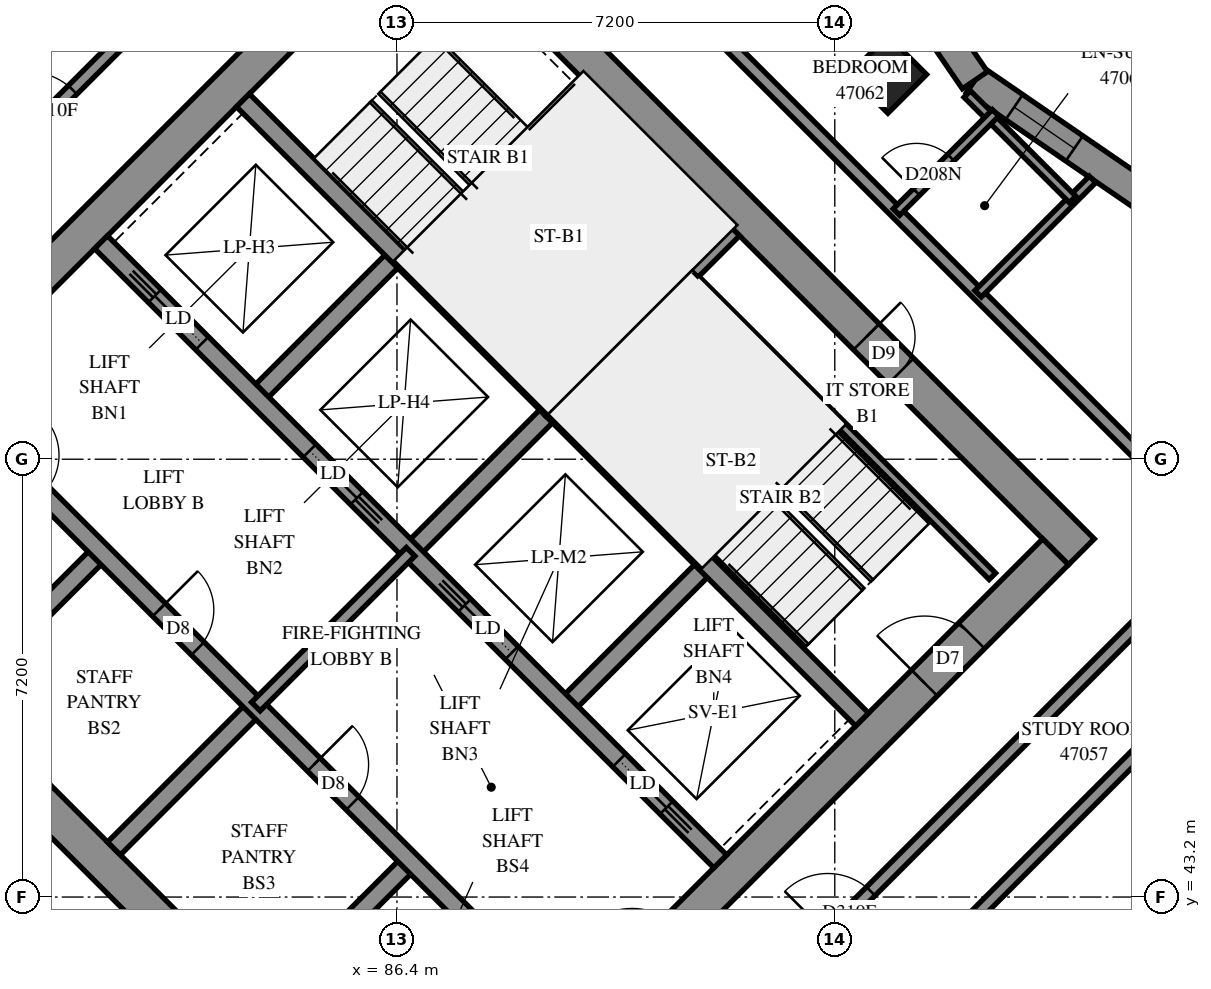
"""IFC4 building model, lengths in metres.
Left out: names, types, materials, properties, quantities, classifications, styles, units other than length and angle.
Written with IfcOpenShell. Run it as: python <this file> out.ifc"""

import sys

from ifc_helpers import new_model, si_unit, direction, frame, frame_2d, origin, origin_2d, place, context, subcontext, project, spatial, polyline, rectangle, outline, extrude, element, fill, save


model = new_model("IFC4")
c1 = context("Model", 3, precision=1e-05, world=origin(), true_north=direction((0.0, 1.0)))
c2 = subcontext(c1, "Body", "Model", "MODEL_VIEW")
j1 = project(units=[si_unit("LENGTHUNIT", "METRE"), si_unit("PLANEANGLEUNIT", "RADIAN")], contexts=[c1])
p1 = place(None, origin())
s1 = spatial("IfcSite", under=j1, at=p1, CompositionType="ELEMENT")
p2 = place(p1, origin())
s2 = spatial("IfcBuilding", under=s1, at=p2, CompositionType="ELEMENT")
p3 = place(p2, frame((0.0, 0.0, 172.8)))
s3 = spatial("IfcBuildingStorey", under=s2, at=p3, CompositionType="ELEMENT", Elevation=172.8)
p4 = place(p3, frame((94.474, 56.727, 0.0), z_axis=(0.0, 0.0, 1.0), x_axis=(0.7071067812, -0.7071067812, 0.0)))
e1 = element("IfcColumn", 1, at=p4, inside=s3, PredefinedType="COLUMN", context=c2, shape_type="SweptSolid", body=[
    extrude(rectangle(XDim=0.9, YDim=0.9, at=origin_2d()), origin(), (0.0, 0.0, 1.0), 3.1),
])
p5 = place(p3, frame((76.018, 49.302, -0.3), z_axis=(0.0, 0.0, 1.0), x_axis=(0.7071067812, -0.7071067812, 0.0)))
e2 = element("IfcWall", 2, at=p5, inside=s3, PredefinedType="SHEAR", context=c2, shape_type="SweptSolid", body=[
    extrude(rectangle(XDim=15.6, YDim=0.6, at=frame_2d((7.8, 0.0))), origin(), (0.0, 0.0, 1.0), 2.7),
])
p6 = place(p3, frame((86.625, 59.908, -0.3), z_axis=(0.0, 0.0, 1.0), x_axis=(0.7071067812, -0.7071067812, 0.0)))
e3 = element("IfcWall", 3, at=p6, inside=s3, PredefinedType="SHEAR", context=c2, shape_type="SweptSolid", body=[
    extrude(rectangle(XDim=15.6, YDim=0.6, at=frame_2d((7.8, 0.0))), origin(), (0.0, 0.0, 1.0), 2.7),
])
p7 = place(p6, frame((10.6, 0.0, 0.3)))
e4 = element("IfcOpeningElement", 4, at=p7, cuts=e3, PredefinedType="OPENING", context=c2, shape_type="SweptSolid", body=[
    extrude(rectangle(XDim=0.8, YDim=2.1, at=frame_2d((0.4, 1.05))), frame((0.0, 0.31, 0.0), z_axis=(0.0, -1.0, 0.0), x_axis=(1.0, 0.0, 0.0)), (0.0, 0.0, 1.0), 0.62),
])
p8 = place(p3, frame((76.442, 49.302, -0.3), z_axis=(0.0, 0.0, 1.0), x_axis=(0.7071067812, 0.7071067812, 0.0)))
e5 = element("IfcWall", 5, at=p8, inside=s3, PredefinedType="SHEAR", context=c2, shape_type="SweptSolid", body=[
    extrude(rectangle(XDim=14.4, YDim=0.6, at=frame_2d((7.2, 0.0))), origin(), (0.0, 0.0, 1.0), 2.7),
])
p9 = place(p8, frame((4.55, 0.0, 0.3)))
e6 = element("IfcOpeningElement", 6, at=p9, cuts=e5, PredefinedType="OPENING", context=c2, shape_type="SweptSolid", body=[
    extrude(rectangle(XDim=1.1, YDim=2.1, at=frame_2d((0.55, 1.05))), frame((0.0, 0.31, 0.0), z_axis=(0.0, -1.0, 0.0), x_axis=(1.0, 0.0, 0.0)), (0.0, 0.0, 1.0), 0.62),
])
p10 = place(p8, frame((11.35, 0.0, 0.3)))
e7 = element("IfcOpeningElement", 7, at=p10, cuts=e5, PredefinedType="OPENING", context=c2, shape_type="SweptSolid", body=[
    extrude(rectangle(XDim=1.1, YDim=2.1, at=frame_2d((0.55, 1.05))), frame((0.0, 0.31, 0.0), z_axis=(0.0, -1.0, 0.0), x_axis=(1.0, 0.0, 0.0)), (0.0, 0.0, 1.0), 0.62),
])
p11 = place(p3, frame((87.049, 38.695, -0.3), z_axis=(0.0, 0.0, 1.0), x_axis=(0.7071067812, 0.7071067812, 0.0)))
e8 = element("IfcWall", 8, at=p11, inside=s3, PredefinedType="SHEAR", context=c2, shape_type="SweptSolid", body=[
    extrude(rectangle(XDim=14.4, YDim=0.6, at=frame_2d((7.2, 0.0))), origin(), (0.0, 0.0, 1.0), 2.7),
])
p12 = place(p11, frame((4.55, 0.0, 0.3)))
e9 = element("IfcOpeningElement", 9, at=p12, cuts=e8, PredefinedType="OPENING", context=c2, shape_type="SweptSolid", body=[
    extrude(rectangle(XDim=1.1, YDim=2.1, at=frame_2d((0.55, 1.05))), frame((0.0, 0.31, 0.0), z_axis=(0.0, -1.0, 0.0), x_axis=(1.0, 0.0, 0.0)), (0.0, 0.0, 1.0), 0.62),
])
p13 = place(p11, frame((11.35, 0.0, 0.3)))
e10 = element("IfcOpeningElement", 10, at=p13, cuts=e8, PredefinedType="OPENING", context=c2, shape_type="SweptSolid", body=[
    extrude(rectangle(XDim=1.1, YDim=2.1, at=frame_2d((0.55, 1.05))), frame((0.0, 0.31, 0.0), z_axis=(0.0, -1.0, 0.0), x_axis=(1.0, 0.0, 0.0)), (0.0, 0.0, 1.0), 0.62),
])
for number, where, z_axis, x_axis in (
    (11, (79.2, 46.544, 0.0), (0.0, 0.0, 1.0), (0.707, 0.707, 0.0)),
    (12, (84.079, 51.423, 0.0), (0.0, 0.0, 1.0), (0.707, 0.707, 0.0)),
):
    element("IfcWall", number, at=place(p3, frame(where, z_axis=z_axis, x_axis=x_axis)), inside=s3, PredefinedType="SOLIDWALL", context=c2, shape_type="SweptSolid", body=[
        extrude(rectangle(XDim=3.3, YDim=0.3, at=frame_2d((1.65, 0.0))), origin(), (0.0, 0.0, 1.0), 3.1),
    ])
p14 = place(p3, frame((81.746, 43.999, 0.0), z_axis=(0.0, 0.0, 1.0), x_axis=(0.7071067812, 0.7071067812, 0.0)))
e13 = element("IfcWall", 13, at=p14, inside=s3, PredefinedType="SOLIDWALL", context=c2, shape_type="SweptSolid", body=[
    extrude(rectangle(XDim=3.3, YDim=0.3, at=frame_2d((1.65, 0.0))), origin(), (0.0, 0.0, 1.0), 3.1),
])
p15 = place(p3, frame((86.625, 48.878, 0.0), z_axis=(0.0, 0.0, 1.0), x_axis=(0.7071067812, 0.7071067812, 0.0)))
e14 = element("IfcWall", 14, at=p15, inside=s3, PredefinedType="SOLIDWALL", context=c2, shape_type="SweptSolid", body=[
    extrude(rectangle(XDim=3.3, YDim=0.3, at=frame_2d((1.65, 0.0))), origin(), (0.0, 0.0, 1.0), 3.1),
])
p16 = place(p3, frame((84.291, 41.453, 0.0), z_axis=(0.0, 0.0, 1.0), x_axis=(0.7071067812, 0.7071067812, 0.0)))
e15 = element("IfcWall", 15, at=p16, inside=s3, PredefinedType="SOLIDWALL", context=c2, shape_type="SweptSolid", body=[
    extrude(rectangle(XDim=3.3, YDim=0.3, at=frame_2d((1.65, 0.0))), origin(), (0.0, 0.0, 1.0), 3.1),
])
p17 = place(p3, frame((89.17, 46.332, 0.0), z_axis=(0.0, 0.0, 1.0), x_axis=(0.7071067812, 0.7071067812, 0.0)))
e16 = element("IfcWall", 16, at=p17, inside=s3, PredefinedType="SOLIDWALL", context=c2, shape_type="SweptSolid", body=[
    extrude(rectangle(XDim=3.3, YDim=0.3, at=frame_2d((1.65, 0.0))), origin(), (0.0, 0.0, 1.0), 3.1),
])
p18 = place(p3, frame((78.988, 51.423, 0.0), z_axis=(0.0, 0.0, 1.0), x_axis=(0.7071067812, -0.7071067812, 0.0)))
e17 = element("IfcWall", 17, at=p18, inside=s3, PredefinedType="SOLIDWALL", context=c2, shape_type="SweptSolid", body=[
    extrude(rectangle(XDim=14.4, YDim=0.3, at=frame_2d((7.2, 0.0))), origin(), (0.0, 0.0, 1.0), 3.1),
])
p19 = place(p18, frame((1.35, 0.0, 0.0)))
e18 = element("IfcOpeningElement", 18, at=p19, cuts=e17, PredefinedType="OPENING", context=c2, shape_type="SweptSolid", body=[
    extrude(rectangle(XDim=0.9, YDim=2.1, at=frame_2d((0.45, 1.05))), frame((0.0, 0.16, 0.0), z_axis=(0.0, -1.0, 0.0), x_axis=(1.0, 0.0, 0.0)), (0.0, 0.0, 1.0), 0.32),
])
p20 = place(p18, frame((4.95, 0.0, 0.0)))
e19 = element("IfcOpeningElement", 19, at=p20, cuts=e17, PredefinedType="OPENING", context=c2, shape_type="SweptSolid", body=[
    extrude(rectangle(XDim=0.9, YDim=2.1, at=frame_2d((0.45, 1.05))), frame((0.0, 0.16, 0.0), z_axis=(0.0, -1.0, 0.0), x_axis=(1.0, 0.0, 0.0)), (0.0, 0.0, 1.0), 0.32),
])
p21 = place(p18, frame((8.55, 0.0, 0.0)))
e20 = element("IfcOpeningElement", 20, at=p21, cuts=e17, PredefinedType="OPENING", context=c2, shape_type="SweptSolid", body=[
    extrude(rectangle(XDim=0.9, YDim=2.1, at=frame_2d((0.45, 1.05))), frame((0.0, 0.16, 0.0), z_axis=(0.0, -1.0, 0.0), x_axis=(1.0, 0.0, 0.0)), (0.0, 0.0, 1.0), 0.32),
])
p22 = place(p18, frame((12.05, 0.0, 0.0)))
e21 = element("IfcOpeningElement", 21, at=p22, cuts=e17, PredefinedType="OPENING", context=c2, shape_type="SweptSolid", body=[
    extrude(rectangle(XDim=1.1, YDim=2.1, at=frame_2d((0.55, 1.05))), frame((0.0, 0.16, 0.0), z_axis=(0.0, -1.0, 0.0), x_axis=(1.0, 0.0, 0.0)), (0.0, 0.0, 1.0), 0.32),
])
p23 = place(p3, frame((81.534, 53.969, 0.0), z_axis=(0.0, 0.0, 1.0), x_axis=(0.707103309, -0.7071102534, 0.0)))
e22 = element("IfcWall", 22, at=p23, inside=s3, PredefinedType="SOLIDWALL", context=c2, shape_type="SweptSolid", body=[
    extrude(rectangle(XDim=14.4, YDim=0.3, at=frame_2d((7.2, 0.0))), origin(), (0.0, 0.0, 1.0), 3.1),
])
p24 = place(p23, frame((1.25, 0.0, 0.0)))
e23 = element("IfcOpeningElement", 23, at=p24, cuts=e22, PredefinedType="OPENING", context=c2, shape_type="SweptSolid", body=[
    extrude(rectangle(XDim=1.1, YDim=2.1, at=frame_2d((0.55, 1.05))), frame((0.0, 0.16, 0.0), z_axis=(0.0, -1.0, 0.0), x_axis=(1.0, 0.0, 0.0)), (0.0, 0.0, 1.0), 0.32),
])
p25 = place(p23, frame((4.85, 0.0, 0.0)))
e24 = element("IfcOpeningElement", 24, at=p25, cuts=e22, PredefinedType="OPENING", context=c2, shape_type="SweptSolid", body=[
    extrude(rectangle(XDim=1.1, YDim=2.1, at=frame_2d((0.55, 1.05))), frame((0.0, 0.16, 0.0), z_axis=(0.0, -1.0, 0.0), x_axis=(1.0, 0.0, 0.0)), (0.0, 0.0, 1.0), 0.32),
])
p26 = place(p23, frame((8.45, 0.0, 0.0)))
e25 = element("IfcOpeningElement", 25, at=p26, cuts=e22, PredefinedType="OPENING", context=c2, shape_type="SweptSolid", body=[
    extrude(rectangle(XDim=1.1, YDim=2.1, at=frame_2d((0.55, 1.05))), frame((0.0, 0.16, 0.0), z_axis=(0.0, -1.0, 0.0), x_axis=(1.0, 0.0, 0.0)), (0.0, 0.0, 1.0), 0.32),
])
p27 = place(p23, frame((12.05, 0.0, 0.0)))
e26 = element("IfcOpeningElement", 26, at=p27, cuts=e22, PredefinedType="OPENING", context=c2, shape_type="SweptSolid", body=[
    extrude(rectangle(XDim=1.1, YDim=2.1, at=frame_2d((0.55, 1.05))), frame((0.0, 0.16, 0.0), z_axis=(0.0, -1.0, 0.0), x_axis=(1.0, 0.0, 0.0)), (0.0, 0.0, 1.0), 0.32),
])
for number, where, z_axis, x_axis in (
    (27, (83.867, 56.302, 0.0), (0.0, 0.0, 1.0), (0.707, -0.707, 0.0)),
    (28, (88.958, 51.211, 0.0), (0.0, 0.0, 1.0), (0.707, -0.707, 0.0)),
):
    element("IfcWall", number, at=place(p3, frame(where, z_axis=z_axis, x_axis=x_axis)), inside=s3, PredefinedType="SOLIDWALL", context=c2, shape_type="SweptSolid", body=[
        extrude(rectangle(XDim=7.2, YDim=0.3, at=frame_2d((3.6, 0.0))), origin(), (0.0, 0.0, 1.0), 3.1),
    ])
p28 = place(p3, frame((88.958, 51.211, 0.0), z_axis=(0.0, 0.0, 1.0), x_axis=(0.7071067812, 0.7071067812, 0.0)))
e29 = element("IfcWall", 29, at=p28, inside=s3, PredefinedType="SOLIDWALL", context=c2, shape_type="SweptSolid", body=[
    extrude(rectangle(XDim=4.2, YDim=0.3, at=frame_2d((2.1, 0.0))), origin(), (0.0, 0.0, 1.0), 3.1),
])
p29 = place(p3, frame((98.744, 54.685, 0.0), z_axis=(0.0, 0.0, 1.0), x_axis=(-0.8245797835, 0.5657456855, 0.0)))
e30 = element("IfcWall", 30, at=p29, inside=s3, PredefinedType="SOLIDWALL", context=c2, shape_type="SweptSolid", body=[
    extrude(outline(polyline([(-0.046, -0.25), (3.396, -0.25), (3.489, 0.25), (0.046, 0.25), (-0.046, -0.25)])), origin(), (0.0, 0.0, 1.0), 3.1),
])
p30 = place(p29, frame((1.46, 0.0, 0.45)))
e31 = element("IfcOpeningElement", 31, at=p30, cuts=e30, PredefinedType="OPENING", context=c2, shape_type="SweptSolid", body=[
    extrude(rectangle(XDim=1.2, YDim=2.5, at=frame_2d((0.6, 1.25))), frame((0.0, 0.26, 0.0), z_axis=(0.0, -1.0, 0.0), x_axis=(1.0, 0.0, 0.0)), (0.0, 0.0, 1.0), 0.52),
])
p31 = place(p3, frame((95.905, 56.632, 0.0), z_axis=(0.0, 0.0, 1.0), x_axis=(-0.5657456855, 0.8245797835, 0.0)))
e32 = element("IfcWall", 32, at=p31, inside=s3, PredefinedType="SOLIDWALL", context=c2, shape_type="SweptSolid", body=[
    extrude(outline(polyline([(0.046, -0.25), (3.489, -0.25), (3.396, 0.25), (-0.046, 0.25), (0.046, -0.25)])), origin(), (0.0, 0.0, 1.0), 3.1),
])
p32 = place(p31, frame((1.547, 0.0, 0.45)))
e33 = element("IfcOpeningElement", 33, at=p32, cuts=e32, PredefinedType="OPENING", context=c2, shape_type="SweptSolid", body=[
    extrude(rectangle(XDim=1.2, YDim=2.5, at=frame_2d((0.6, 1.25))), frame((0.0, 0.26, 0.0), z_axis=(0.0, -1.0, 0.0), x_axis=(1.0, 0.0, 0.0)), (0.0, 0.0, 1.0), 0.52),
])
p33 = place(p3, frame((91.313, 53.354, 0.0), z_axis=(0.0, 0.0, 1.0), x_axis=(0.7071140275, -0.7070995348, 0.0)))
e34 = element("IfcWall", 34, at=p33, inside=s3, PredefinedType="PARTITIONING", context=c2, shape_type="SweptSolid", body=[
    extrude(rectangle(XDim=6.9, YDim=0.15, at=frame_2d((3.45, 0.0))), origin(), (0.0, 0.0, 1.0), 3.1),
])
p34 = place(p3, frame((84.079, 46.332, 0.0), z_axis=(0.0, 0.0, 1.0), x_axis=(0.7071067812, 0.7071067812, 0.0)))
e35 = element("IfcWall", 35, at=p34, inside=s3, PredefinedType="PARTITIONING", context=c2, shape_type="SweptSolid", body=[
    extrude(rectangle(XDim=3.6, YDim=0.2, at=frame_2d((1.8, 0.0))), origin(), (0.0, 0.0, 1.0), 3.1),
])
p35 = place(p3, frame((94.366, 41.348, 0.0), z_axis=(0.0, 0.0, 1.0), x_axis=(0.7071108825, 0.7071026798, 0.0)))
e36 = element("IfcWall", 36, at=p35, inside=s3, PredefinedType="PARTITIONING", context=c2, shape_type="SweptSolid", body=[
    extrude(rectangle(XDim=12.191, YDim=0.2, at=frame_2d((6.096, 0.0))), origin(), (0.0, 0.0, 1.0), 3.1),
])
p36 = place(p3, frame((91.755, 57.317, 0.0), z_axis=(0.0, 0.0, 1.0), x_axis=(0.7071067812, -0.7071067812, 0.0)))
e37 = element("IfcWall", 37, at=p36, inside=s3, PredefinedType="PARTITIONING", context=c2, shape_type="SweptSolid", body=[
    extrude(rectangle(XDim=11.639, YDim=0.2, at=frame_2d((5.819, 0.0))), origin(), (0.0, 0.0, 1.0), 3.1),
])
p37 = place(p3, frame((80.154, 55.56, 0.0), z_axis=(0.0, 0.0, 1.0), x_axis=(0.7071067812, 0.7071067812, 0.0)))
e38 = element("IfcWall", 38, at=p37, inside=s3, PredefinedType="PARTITIONING", context=c2, shape_type="SweptSolid", body=[
    extrude(rectangle(XDim=9.45, YDim=0.2, at=frame_2d((4.725, 0.0))), origin(), (0.0, 0.0, 1.0), 3.1),
])
p38 = place(p37, frame((0.292, 0.0, 0.0)))
e39 = element("IfcOpeningElement", 39, at=p38, cuts=e38, PredefinedType="OPENING", context=c2, shape_type="SweptSolid", body=[
    extrude(rectangle(XDim=1.0, YDim=2.1, at=frame_2d((0.5, 1.05))), frame((0.0, 0.11, 0.0), z_axis=(0.0, -1.0, 0.0), x_axis=(1.0, 0.0, 0.0)), (0.0, 0.0, 1.0), 0.22),
])
p39 = place(p3, frame((93.306, 42.408, 0.0), z_axis=(0.0, 0.0, 1.0), x_axis=(0.7071067812, 0.7071067812, 0.0)))
e40 = element("IfcWall", 40, at=p39, inside=s3, PredefinedType="PARTITIONING", context=c2, shape_type="SweptSolid", body=[
    extrude(rectangle(XDim=9.45, YDim=0.2, at=frame_2d((4.725, 0.0))), origin(), (0.0, 0.0, 1.0), 3.1),
])
p40 = place(p39, frame((0.253, 0.0, 0.0)))
e41 = element("IfcOpeningElement", 41, at=p40, cuts=e40, PredefinedType="OPENING", context=c2, shape_type="SweptSolid", body=[
    extrude(rectangle(XDim=1.0, YDim=2.1, at=frame_2d((0.5, 1.05))), frame((0.0, 0.11, 0.0), z_axis=(0.0, -1.0, 0.0), x_axis=(1.0, 0.0, 0.0)), (0.0, 0.0, 1.0), 0.22),
])
p41 = place(p3, frame((95.957, 53.121, 0.0), z_axis=(0.0, 0.0, 1.0), x_axis=(0.7070879914, 0.7071255705, 0.0)))
e42 = element("IfcWall", 42, at=p41, inside=s3, PredefinedType="PARTITIONING", context=c2, shape_type="SweptSolid", body=[
    extrude(rectangle(XDim=2.661, YDim=0.15, at=frame_2d((1.331, 0.0))), origin(), (0.0, 0.0, 1.0), 3.1),
])
p42 = place(p3, frame((95.779, 56.405, 0.0), z_axis=(0.0, 0.0, 1.0), x_axis=(0.7071067812, -0.7071067812, 0.0)))
e43 = element("IfcWall", 43, at=p42, inside=s3, PredefinedType="PARTITIONING", context=c2, shape_type="SweptSolid", body=[
    extrude(rectangle(XDim=2.449, YDim=0.15, at=frame_2d((1.225, 0.0))), origin(), (0.0, 0.0, 1.0), 3.1),
])
p43 = place(p3, frame((94.614, 54.464, 0.0), z_axis=(0.0, 0.0, 1.0), x_axis=(0.7070851111, 0.7071284506, 0.0)))
e44 = element("IfcWall", 44, at=p43, inside=s3, PredefinedType="PARTITIONING", context=c2, shape_type="SweptSolid", body=[
    extrude(rectangle(XDim=2.307, YDim=0.15, at=frame_2d((1.154, 0.0))), origin(), (0.0, 0.0, 1.0), 3.1),
])
p44 = place(p43, frame((0.466, 0.0, 0.0)))
e45 = element("IfcOpeningElement", 45, at=p44, cuts=e44, PredefinedType="OPENING", context=c2, shape_type="SweptSolid", body=[
    extrude(rectangle(XDim=0.8, YDim=2.1, at=frame_2d((0.4, 1.05))), frame((0.0, 0.085, 0.0), z_axis=(0.0, -1.0, 0.0), x_axis=(1.0, 0.0, 0.0)), (0.0, 0.0, 1.0), 0.17),
])
p45 = place(p30, origin())
e46 = element("IfcWindow", 46, at=p45, inside=s3, PartitioningType="SINGLE_PANEL", PredefinedType="WINDOW", context=c2, shape_type="SweptSolid", body=[
    extrude(rectangle(XDim=1.2, YDim=2.5, at=frame_2d((0.6, 1.25))), frame((0.0, 0.18, 0.0), z_axis=(0.0, -1.0, 0.0), x_axis=(1.0, 0.0, 0.0)), (0.0, 0.0, 1.0), 0.06),
])
fill(e31, e46)
p46 = place(p7, origin())
e47 = element("IfcDoor", 47, at=p46, inside=s3, OperationType="SINGLE_SWING_RIGHT", PredefinedType="DOOR", context=c2, shape_type="SweptSolid", body=[
    extrude(rectangle(XDim=0.8, YDim=2.1, at=frame_2d((0.4, 1.05))), frame((0.0, 0.025, 0.0), z_axis=(0.0, -1.0, 0.0), x_axis=(1.0, 0.0, 0.0)), (0.0, 0.0, 1.0), 0.05),
])
fill(e4, e47)
p47 = place(p13, origin())
e48 = element("IfcDoor", 48, at=p47, inside=s3, OperationType="SINGLE_SWING_RIGHT", PredefinedType="DOOR", context=c2, shape_type="SweptSolid", body=[
    extrude(rectangle(XDim=1.1, YDim=2.1, at=frame_2d((0.55, 1.05))), frame((0.0, 0.025, 0.0), z_axis=(0.0, -1.0, 0.0), x_axis=(1.0, 0.0, 0.0)), (0.0, 0.0, 1.0), 0.05),
])
fill(e10, e48)
p48 = place(p20, origin())
e49 = element("IfcDoor", 49, at=p48, inside=s3, OperationType="SINGLE_SWING_LEFT", PredefinedType="DOOR", context=c2, shape_type="SweptSolid", body=[
    extrude(rectangle(XDim=0.9, YDim=2.1, at=frame_2d((0.45, 1.05))), frame((0.0, 0.025, 0.0), z_axis=(0.0, -1.0, 0.0), x_axis=(1.0, 0.0, 0.0)), (0.0, 0.0, 1.0), 0.05),
])
fill(e19, e49)
p49 = place(p21, origin())
e50 = element("IfcDoor", 50, at=p49, inside=s3, OperationType="SINGLE_SWING_LEFT", PredefinedType="DOOR", context=c2, shape_type="SweptSolid", body=[
    extrude(rectangle(XDim=0.9, YDim=2.1, at=frame_2d((0.45, 1.05))), frame((0.0, 0.025, 0.0), z_axis=(0.0, -1.0, 0.0), x_axis=(1.0, 0.0, 0.0)), (0.0, 0.0, 1.0), 0.05),
])
fill(e20, e50)
p50 = place(p24, origin())
e51 = element("IfcDoor", 51, at=p50, inside=s3, OperationType="SLIDING_TO_LEFT", PredefinedType="DOOR", context=c2, shape_type="SweptSolid", body=[
    extrude(rectangle(XDim=1.1, YDim=2.1, at=frame_2d((0.55, 1.05))), frame((0.0, 0.025, 0.0), z_axis=(0.0, -1.0, 0.0), x_axis=(1.0, 0.0, 0.0)), (0.0, 0.0, 1.0), 0.05),
])
fill(e23, e51)
p51 = place(p25, origin())
e52 = element("IfcDoor", 52, at=p51, inside=s3, OperationType="SLIDING_TO_RIGHT", PredefinedType="DOOR", context=c2, shape_type="SweptSolid", body=[
    extrude(rectangle(XDim=1.1, YDim=2.1, at=frame_2d((0.55, 1.05))), frame((0.0, 0.025, 0.0), z_axis=(0.0, -1.0, 0.0), x_axis=(1.0, 0.0, 0.0)), (0.0, 0.0, 1.0), 0.05),
])
fill(e24, e52)
p52 = place(p26, origin())
e53 = element("IfcDoor", 53, at=p52, inside=s3, OperationType="SLIDING_TO_LEFT", PredefinedType="DOOR", context=c2, shape_type="SweptSolid", body=[
    extrude(rectangle(XDim=1.1, YDim=2.1, at=frame_2d((0.55, 1.05))), frame((0.0, 0.025, 0.0), z_axis=(0.0, -1.0, 0.0), x_axis=(1.0, 0.0, 0.0)), (0.0, 0.0, 1.0), 0.05),
])
fill(e25, e53)
p53 = place(p27, origin())
e54 = element("IfcDoor", 54, at=p53, inside=s3, OperationType="SLIDING_TO_RIGHT", PredefinedType="DOOR", context=c2, shape_type="SweptSolid", body=[
    extrude(rectangle(XDim=1.1, YDim=2.1, at=frame_2d((0.55, 1.05))), frame((0.0, 0.025, 0.0), z_axis=(0.0, -1.0, 0.0), x_axis=(1.0, 0.0, 0.0)), (0.0, 0.0, 1.0), 0.05),
])
fill(e26, e54)
p54 = place(p38, origin())
e55 = element("IfcDoor", 55, at=p54, inside=s3, OperationType="SINGLE_SWING_LEFT", PredefinedType="DOOR", context=c2, shape_type="SweptSolid", body=[
    extrude(rectangle(XDim=1.0, YDim=2.1, at=frame_2d((0.5, 1.05))), frame((0.0, 0.025, 0.0), z_axis=(0.0, -1.0, 0.0), x_axis=(1.0, 0.0, 0.0)), (0.0, 0.0, 1.0), 0.05),
])
fill(e39, e55)
p55 = place(p40, origin())
e56 = element("IfcDoor", 56, at=p55, inside=s3, OperationType="SINGLE_SWING_RIGHT", PredefinedType="DOOR", context=c2, shape_type="SweptSolid", body=[
    extrude(rectangle(XDim=1.0, YDim=2.1, at=frame_2d((0.5, 1.05))), frame((0.0, 0.025, 0.0), z_axis=(0.0, -1.0, 0.0), x_axis=(1.0, 0.0, 0.0)), (0.0, 0.0, 1.0), 0.05),
])
fill(e41, e56)
p56 = place(p44, origin())
e57 = element("IfcDoor", 57, at=p56, inside=s3, OperationType="SINGLE_SWING_RIGHT", PredefinedType="DOOR", context=c2, shape_type="SweptSolid", body=[
    extrude(rectangle(XDim=0.8, YDim=2.1, at=frame_2d((0.4, 1.05))), frame((0.0, 0.025, 0.0), z_axis=(0.0, -1.0, 0.0), x_axis=(1.0, 0.0, 0.0)), (0.0, 0.0, 1.0), 0.05),
])
fill(e45, e57)
save(model, sys.argv[1])
